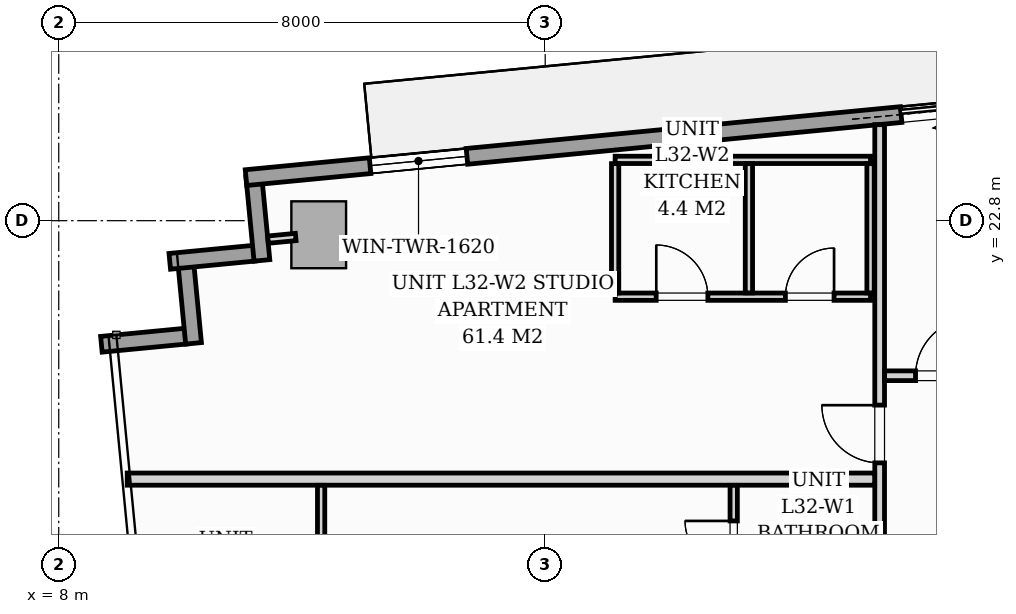
"""IFC4 building model, lengths in metres.
Left out: names, types, materials, properties, quantities, classifications, styles, units other than length and angle.
Written with IfcOpenShell. Run it as: python <this file> out.ifc"""

import sys

from ifc_helpers import new_model, si_unit, direction, frame, frame_2d, origin, origin_2d, place, context, subcontext, project, spatial, rectangle, extrude, source, transform, mapped, element, fill, save


model = new_model("IFC4")
c1 = context("Model", 3, precision=1e-05, world=origin(), true_north=direction((0.0, 1.0)))
c2 = subcontext(c1, "Body", "Model", "MODEL_VIEW")
j1 = project(units=[si_unit("LENGTHUNIT", "METRE"), si_unit("PLANEANGLEUNIT", "RADIAN")], contexts=[c1])
p1 = place(None, origin())
s1 = spatial("IfcSite", under=j1, at=p1, CompositionType="ELEMENT")
p2 = place(p1, origin())
s2 = spatial("IfcBuilding", under=s1, at=p2, CompositionType="ELEMENT")
p3 = place(p2, frame((0.0, 0.0, 113.0)))
s3 = spatial("IfcBuildingStorey", under=s2, at=p3, CompositionType="ELEMENT", Elevation=113.0)
m1 = source(origin(), c2, "Body", "SweptSolid", [
    extrude(rectangle(XDim=0.9, YDim=1.1, at=origin_2d()), origin(), (0.0, 0.0, 1.0), 3.196),
])
p4 = place(p3, frame((12.275, 22.568, 0.002), z_axis=(0.0, 0.0, 1.0), x_axis=(0.995396198367, 0.09584575252, 0.0)))
e1 = element("IfcColumn", 1, at=p4, inside=s3, PredefinedType="COLUMN", context=c2, shape_type="MappedRepresentation", body=[
    mapped(m1, transform((0.0, 0.0, 0.0), scale=1.0)),
])
for number, where, z_axis, x_axis in (
    (2, (8.701, 20.767, 0.0), (0.0, 0.0, 1.0), (0.995, 0.096, 0.0)),
    (3, (10.217, 20.783, 0.0), (0.0, 0.0, 1.0), (-0.096, 0.995, 0.0)),
):
    element("IfcWall", number, at=place(p3, frame(where, z_axis=z_axis, x_axis=x_axis)), inside=s3, PredefinedType="STANDARD", context=c2, shape_type="SweptSolid", body=[
        extrude(rectangle(XDim=1.395, YDim=0.26, at=frame_2d((0.698, 0.0))), origin(), (0.0, 0.0, 1.0), 2.94),
    ])
p5 = place(p3, frame((9.826, 22.131, 0.0), z_axis=(0.0, 0.0, 1.0), x_axis=(0.995389446633, 0.095915846097, 0.0)))
e4 = element("IfcWall", 4, at=p5, inside=s3, PredefinedType="STANDARD", context=c2, shape_type="SweptSolid", body=[
    extrude(rectangle(XDim=1.395, YDim=0.26, at=frame_2d((0.697, 0.0))), origin(), (0.0, 0.0, 1.0), 2.94),
])
p6 = place(p3, frame((11.341, 22.147, 0.0), z_axis=(0.0, 0.0, 1.0), x_axis=(-0.09589913835, 0.995391056452, 0.0)))
e5 = element("IfcWall", 5, at=p6, inside=s3, PredefinedType="STANDARD", context=c2, shape_type="SweptSolid", body=[
    extrude(rectangle(XDim=1.395, YDim=0.26, at=frame_2d((0.698, 0.0))), origin(), (0.0, 0.0, 1.0), 2.94),
])
p7 = place(p3, frame((11.08, 23.508, 0.0), z_axis=(0.0, 0.0, 1.0), x_axis=(0.995396638587, 0.095841180552, 0.0)))
e6 = element("IfcWall", 6, at=p7, inside=s3, PredefinedType="STANDARD", context=c2, shape_type="SweptSolid", body=[
    extrude(rectangle(XDim=19.11, YDim=0.26, at=frame_2d((9.555, 0.0))), origin(), (0.0, 0.0, 1.0), 2.94),
])
p8 = place(p7, frame((10.823, 0.0, 0.0)))
e7 = element("IfcOpeningElement", 7, at=p8, cuts=e6, PredefinedType="OPENING", context=c2, shape_type="SweptSolid", body=[
    extrude(rectangle(XDim=1.8, YDim=2.06, at=frame_2d((0.9, 1.03))), frame((0.0, 0.14, 0.0), z_axis=(0.0, -1.0, 0.0), x_axis=(1.0, 0.0, 0.0)), (0.0, 0.0, 1.0), 0.28),
])
p9 = place(p7, frame((2.05, 0.0, 0.65)))
e8 = element("IfcOpeningElement", 8, at=p9, cuts=e6, PredefinedType="OPENING", context=c2, shape_type="SweptSolid", body=[
    extrude(rectangle(XDim=1.6, YDim=1.5, at=frame_2d((0.8, 0.75))), frame((0.0, 0.14, 0.0), z_axis=(0.0, -1.0, 0.0), x_axis=(1.0, 0.0, 0.0)), (0.0, 0.0, 1.0), 0.28),
])
p10 = place(p3, frame((21.5, 12.732, 0.0), z_axis=(0.0, 0.0, 1.0), x_axis=(0.0, 1.0, 0.0)))
e9 = element("IfcWall", 9, at=p10, inside=s3, PredefinedType="PARTITIONING", context=c2, shape_type="SweptSolid", body=[
    extrude(rectangle(XDim=11.647, YDim=0.16, at=frame_2d((5.823, 0.0))), origin(), (0.0, 0.0, 1.0), 2.94),
])
p11 = place(p10, frame((0.493, 0.0, 0.0)))
e10 = element("IfcOpeningElement", 10, at=p11, cuts=e9, PredefinedType="OPENING", context=c2, shape_type="SweptSolid", body=[
    extrude(rectangle(XDim=0.95, YDim=2.06, at=frame_2d((0.475, 1.03))), frame((0.0, 0.09, 0.0), z_axis=(0.0, -1.0, 0.0), x_axis=(1.0, 0.0, 0.0)), (0.0, 0.0, 1.0), 0.18),
])
p12 = place(p10, frame((6.085, 0.0, 0.0)))
e11 = element("IfcOpeningElement", 11, at=p12, cuts=e9, PredefinedType="OPENING", context=c2, shape_type="SweptSolid", body=[
    extrude(rectangle(XDim=0.95, YDim=2.06, at=frame_2d((0.475, 1.03))), frame((0.0, 0.09, 0.0), z_axis=(0.0, -1.0, 0.0), x_axis=(1.0, 0.0, 0.0)), (0.0, 0.0, 1.0), 0.18),
])
p13 = place(p3, frame((9.126, 18.55, 0.0), z_axis=(0.0, 0.0, 1.0), x_axis=(1.0, 0.0, 0.0)))
e12 = element("IfcWall", 12, at=p13, inside=s3, PredefinedType="PARTITIONING", context=c2, shape_type="SweptSolid", body=[
    extrude(rectangle(XDim=12.292, YDim=0.2, at=frame_2d((6.146, 0.0))), origin(), (0.0, 0.0, 1.0), 2.94),
])
p14 = place(p3, frame((19.1, 14.5, 0.0), z_axis=(0.0, 0.0, 1.0), x_axis=(0.0, 1.0, 0.0)))
e13 = element("IfcWall", 13, at=p14, inside=s3, PredefinedType="PARTITIONING", context=c2, shape_type="SweptSolid", body=[
    extrude(rectangle(XDim=3.948, YDim=0.12, at=frame_2d((1.974, 0.0))), origin(), (0.0, 0.0, 1.0), 2.94),
])
p15 = place(p14, frame((0.563, 0.0, 0.0)))
e14 = element("IfcOpeningElement", 14, at=p15, cuts=e13, PredefinedType="OPENING", context=c2, shape_type="SweptSolid", body=[
    extrude(rectangle(XDim=0.85, YDim=2.05, at=frame_2d((0.425, 1.025))), frame((0.0, 0.07, 0.0), z_axis=(0.0, -1.0, 0.0), x_axis=(1.0, 0.0, 0.0)), (0.0, 0.0, 1.0), 0.14),
])
p16 = place(p14, frame((2.562, 0.0, 0.0)))
e15 = element("IfcOpeningElement", 15, at=p16, cuts=e13, PredefinedType="OPENING", context=c2, shape_type="SweptSolid", body=[
    extrude(rectangle(XDim=0.8, YDim=2.02, at=frame_2d((0.4, 1.01))), frame((0.0, 0.07, 0.0), z_axis=(0.0, -1.0, 0.0), x_axis=(1.0, 0.0, 0.0)), (0.0, 0.0, 1.0), 0.14),
])
p17 = place(p3, frame((12.315, 5.184, 0.0), z_axis=(0.0, 0.0, 1.0), x_axis=(0.0, 1.0, 0.0)))
e16 = element("IfcWall", 16, at=p17, inside=s3, PredefinedType="PARTITIONING", context=c2, shape_type="SweptSolid", body=[
    extrude(rectangle(XDim=13.264, YDim=0.12, at=frame_2d((6.632, 0.0))), origin(), (0.0, 0.0, 1.0), 2.94),
])
p18 = place(p17, frame((6.076, 0.0, 0.0)))
e17 = element("IfcOpeningElement", 17, at=p18, cuts=e16, PredefinedType="OPENING", context=c2, shape_type="SweptSolid", body=[
    extrude(rectangle(XDim=0.85, YDim=2.05, at=frame_2d((0.425, 1.025))), frame((0.0, 0.07, 0.0), z_axis=(0.0, -1.0, 0.0), x_axis=(1.0, 0.0, 0.0)), (0.0, 0.0, 1.0), 0.14),
])
p19 = place(p3, frame((17.15, 21.55, 0.0), z_axis=(0.0, 0.0, 1.0), x_axis=(1.0, 0.0, 0.0)))
e18 = element("IfcWall", 18, at=p19, inside=s3, PredefinedType="PARTITIONING", context=c2, shape_type="SweptSolid", body=[
    extrude(rectangle(XDim=4.2, YDim=0.12, at=frame_2d((2.1, 0.0))), origin(), (0.0, 0.0, 1.0), 2.94),
])
p20 = place(p19, frame((0.675, 0.0, 0.0)))
e19 = element("IfcOpeningElement", 19, at=p20, cuts=e18, PredefinedType="OPENING", context=c2, shape_type="SweptSolid", body=[
    extrude(rectangle(XDim=0.85, YDim=2.05, at=frame_2d((0.425, 1.025))), frame((0.0, 0.07, 0.0), z_axis=(0.0, -1.0, 0.0), x_axis=(1.0, 0.0, 0.0)), (0.0, 0.0, 1.0), 0.14),
])
p21 = place(p19, frame((2.8, 0.0, 0.0)))
e20 = element("IfcOpeningElement", 20, at=p21, cuts=e18, PredefinedType="OPENING", context=c2, shape_type="SweptSolid", body=[
    extrude(rectangle(XDim=0.8, YDim=2.02, at=frame_2d((0.4, 1.01))), frame((0.0, 0.07, 0.0), z_axis=(0.0, -1.0, 0.0), x_axis=(1.0, 0.0, 0.0)), (0.0, 0.0, 1.0), 0.14),
])
p22 = place(p3, frame((17.15, 23.8, 0.0), z_axis=(0.0, 0.0, 1.0), x_axis=(1.0, 0.0, 0.0)))
e21 = element("IfcWall", 21, at=p22, inside=s3, PredefinedType="PARTITIONING", context=c2, shape_type="SweptSolid", body=[
    extrude(rectangle(XDim=4.2, YDim=0.12, at=frame_2d((2.1, 0.0))), origin(), (0.0, 0.0, 1.0), 2.31),
])
for number, where, z_axis, x_axis in (
    (22, (17.15, 21.612, 0.0), (0.0, 0.0, 1.0), (0.0, 1.0, 0.0)),
    (23, (19.35, 21.612, 0.0), (0.0, 0.0, 1.0), (0.0, 1.0, 0.0)),
    (24, (21.35, 21.612, 0.0), (0.0, 0.0, 1.0), (0.0, 1.0, 0.0)),
):
    element("IfcWall", number, at=place(p3, frame(where, z_axis=z_axis, x_axis=x_axis)), inside=s3, PredefinedType="PARTITIONING", context=c2, shape_type="SweptSolid", body=[
        extrude(rectangle(XDim=2.126, YDim=0.12, at=frame_2d((1.063, 0.0))), origin(), (0.0, 0.0, 1.0), 2.94),
    ])
p23 = place(p3, frame((21.582, 20.25, 0.0), z_axis=(0.0, 0.0, 1.0), x_axis=(1.0, 0.0, 0.0)))
e25 = element("IfcWall", 25, at=p23, inside=s3, PredefinedType="PARTITIONING", context=c2, shape_type="SweptSolid", body=[
    extrude(rectangle(XDim=1.886, YDim=0.16, at=frame_2d((0.943, 0.0))), origin(), (0.0, 0.0, 1.0), 2.94),
])
p24 = place(p23, frame((0.508, 0.0, 0.0)))
e26 = element("IfcOpeningElement", 26, at=p24, cuts=e25, PredefinedType="OPENING", context=c2, shape_type="SweptSolid", body=[
    extrude(rectangle(XDim=0.95, YDim=2.06, at=frame_2d((0.475, 1.03))), frame((0.0, 0.09, 0.0), z_axis=(0.0, -1.0, 0.0), x_axis=(1.0, 0.0, 0.0)), (0.0, 0.0, 1.0), 0.18),
])
p25 = place(p3, frame((11.897, 22.532, 0.0), z_axis=(0.0, 0.0, 1.0), x_axis=(-0.995384576284, -0.09596637586, 0.0)))
e27 = element("IfcWall", 27, at=p25, inside=s3, PredefinedType="PARTITIONING", context=c2, shape_type="SweptSolid", body=[
    extrude(rectangle(XDim=0.458, YDim=0.12, at=frame_2d((0.229, 0.0))), origin(), (0.0, 0.0, 1.0), 2.94),
])
m2 = source(origin(), c2, "Body", "SweptSolid", [
    extrude(rectangle(XDim=1.8, YDim=2.06, at=frame_2d((0.9, 1.03))), frame((0.0, 0.025, 0.0), z_axis=(0.0, -1.0, 0.0), x_axis=(1.0, 0.0, 0.0)), (0.0, 0.0, 1.0), 0.05),
])
p26 = place(p8, origin())
e28 = element("IfcDoor", 28, at=p26, inside=s3, OperationType="SLIDING_TO_LEFT", PredefinedType="DOOR", context=c2, shape_type="MappedRepresentation", body=[
    mapped(m2, transform((0.0, 0.0, 0.0), scale=1.0)),
])
fill(e7, e28)
m3 = source(origin(), c2, "Body", "SweptSolid", [
    extrude(rectangle(XDim=1.6, YDim=1.5, at=frame_2d((0.8, 0.75))), frame((0.0, 0.03, 0.0), z_axis=(0.0, -1.0, 0.0), x_axis=(1.0, 0.0, 0.0)), (0.0, 0.0, 1.0), 0.06),
])
p27 = place(p9, origin())
e29 = element("IfcWindow", 29, at=p27, inside=s3, PartitioningType="SINGLE_PANEL", PredefinedType="WINDOW", context=c2, shape_type="MappedRepresentation", body=[
    mapped(m3, transform((0.0, 0.0, 0.0), scale=1.0)),
])
fill(e8, e29)
m4 = source(origin(), c2, "Body", "SweptSolid", [
    extrude(rectangle(XDim=0.8, YDim=2.02, at=frame_2d((0.4, 1.01))), frame((0.0, 0.025, 0.0), z_axis=(0.0, -1.0, 0.0), x_axis=(1.0, 0.0, 0.0)), (0.0, 0.0, 1.0), 0.05),
])
p28 = place(p16, origin())
e30 = element("IfcDoor", 30, at=p28, inside=s3, OperationType="SINGLE_SWING_RIGHT", PredefinedType="DOOR", context=c2, shape_type="MappedRepresentation", body=[
    mapped(m4, transform((0.0, 0.0, 0.0), scale=1.0)),
])
fill(e15, e30)
m5 = source(origin(), c2, "Body", "SweptSolid", [
    extrude(rectangle(XDim=0.95, YDim=2.06, at=frame_2d((0.475, 1.03))), frame((0.0, 0.025, 0.0), z_axis=(0.0, -1.0, 0.0), x_axis=(1.0, 0.0, 0.0)), (0.0, 0.0, 1.0), 0.05),
])
p29 = place(p12, origin())
e31 = element("IfcDoor", 31, at=p29, inside=s3, OperationType="SINGLE_SWING_RIGHT", PredefinedType="DOOR", context=c2, shape_type="MappedRepresentation", body=[
    mapped(m5, transform((0.0, 0.0, 0.0), scale=1.0)),
])
fill(e11, e31)
m6 = source(origin(), c2, "Body", "SweptSolid", [
    extrude(rectangle(XDim=0.85, YDim=2.05, at=frame_2d((0.425, 1.025))), frame((0.0, 0.025, 0.0), z_axis=(0.0, -1.0, 0.0), x_axis=(1.0, 0.0, 0.0)), (0.0, 0.0, 1.0), 0.05),
])
p30 = place(p20, origin())
e32 = element("IfcDoor", 32, at=p30, inside=s3, OperationType="SINGLE_SWING_LEFT", PredefinedType="DOOR", context=c2, shape_type="MappedRepresentation", body=[
    mapped(m6, transform((0.0, 0.0, 0.0), scale=1.0)),
])
fill(e19, e32)
p31 = place(p21, origin())
e33 = element("IfcDoor", 33, at=p31, inside=s3, OperationType="SINGLE_SWING_RIGHT", PredefinedType="DOOR", context=c2, shape_type="MappedRepresentation", body=[
    mapped(m4, transform((0.0, 0.0, 0.0), scale=1.0)),
])
fill(e20, e33)
p32 = place(p24, origin())
e34 = element("IfcDoor", 34, at=p32, inside=s3, OperationType="SINGLE_SWING_RIGHT", PredefinedType="DOOR", context=c2, shape_type="MappedRepresentation", body=[
    mapped(m5, transform((0.0, 0.0, 0.0), scale=1.0)),
])
fill(e26, e34)
save(model, sys.argv[1])
